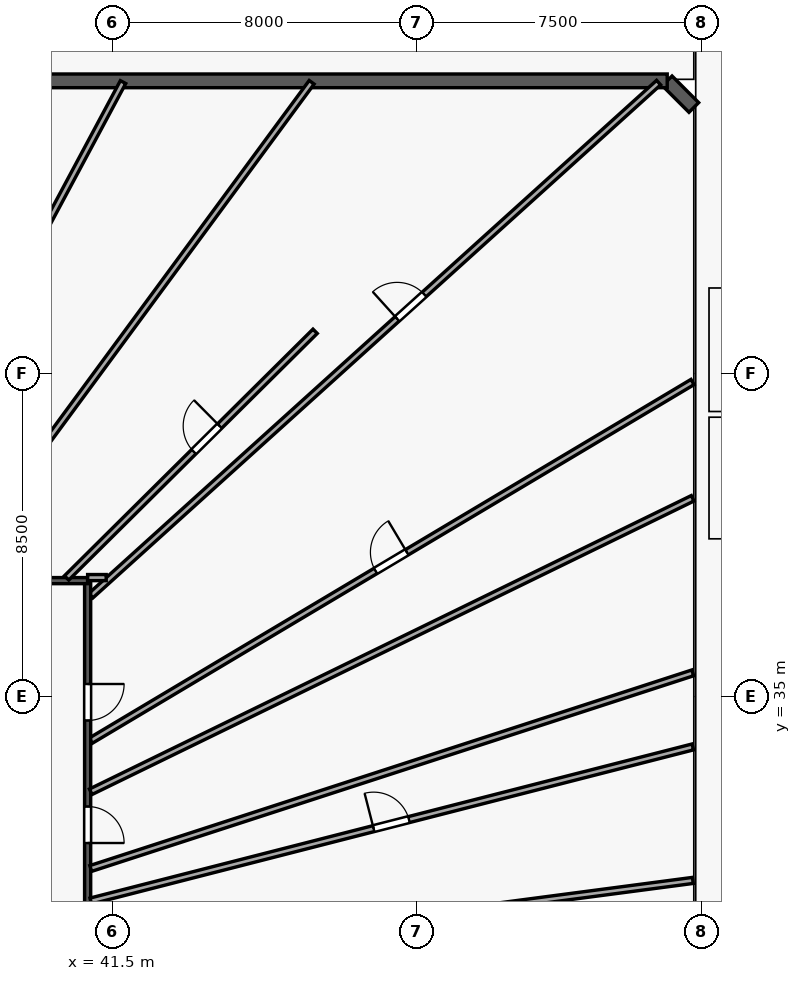
"""IFC4 building model, lengths in metres.
Left out: names, types, materials, properties, quantities, classifications, styles, units other than length and angle.
Written with IfcOpenShell. Run it as: python <this file> out.ifc"""

import sys

from ifc_helpers import new_model, si_unit, direction, frame, frame_2d, origin, origin_with_axes, origin_2d, place, context, subcontext, project, spatial, rectangle, circle, extrude, source, transform, mapped, element, fill, save


model = new_model("IFC4")
c1 = context("Model", 3, precision=1e-05, world=origin(), true_north=direction((0.0, 1.0)))
c2 = subcontext(c1, "Body", "Model", "MODEL_VIEW")
j1 = project(units=[si_unit("LENGTHUNIT", "METRE"), si_unit("PLANEANGLEUNIT", "RADIAN")], contexts=[c1])
p1 = place(None, origin())
s1 = spatial("IfcSite", under=j1, at=p1, CompositionType="ELEMENT")
p2 = place(p1, origin())
s2 = spatial("IfcBuilding", under=s1, at=p2, CompositionType="ELEMENT")
p3 = place(p2, origin())
s3 = spatial("IfcBuildingStorey", under=s2, at=p3, CompositionType="ELEMENT", Elevation=0.0)
m1 = source(origin_with_axes(), c2, "Body", "SweptSolid", [
    extrude(circle(Radius=0.9, at=origin_2d()), origin(), (0.0, 0.0, 1.0), 4.5),
])
p4 = place(p3, frame((46.8, 45.5, 0.0), z_axis=(0.0, 0.0, 1.0), x_axis=(1.0, 0.0, 0.0)))
e1 = element("IfcColumn", 1, at=p4, inside=s3, PredefinedType="COLUMN", context=c2, shape_type="MappedRepresentation", body=[
    mapped(m1, transform((0.0, 0.0, 0.0), scale=1.0)),
])
m2 = source(origin_with_axes(), c2, "Body", "SweptSolid", [
    extrude(rectangle(XDim=0.6, YDim=0.9, at=origin_2d()), origin(), (0.0, 0.0, 1.0), 4.5),
])
for number, where, z_axis, x_axis in (
    (2, (54.8, 34.5, 0.0), (0.0, 0.0, 1.0), (1.0, 0.0, 0.0)),
    (3, (54.8, 42.5, 0.0), (0.0, 0.0, 1.0), (1.0, 0.0, 0.0)),
):
    element("IfcColumn", number, at=place(p3, frame(where, z_axis=z_axis, x_axis=x_axis)), inside=s3, PredefinedType="PILASTER", context=c2, shape_type="MappedRepresentation", body=[
        mapped(m2, transform((0.0, 0.0, 0.0), scale=1.0)),
    ])
p5 = place(p3, frame((56.8, 50.5, 0.0), z_axis=(0.0, 0.0, 1.0), x_axis=(-0.707106781187, 0.707106781187, 0.0)))
e4 = element("IfcWall", 4, at=p5, inside=s3, PredefinedType="SOLIDWALL", context=c2, shape_type="SweptSolid", body=[
    extrude(rectangle(XDim=0.99, YDim=0.36, at=frame_2d((0.495, 0.0))), origin(), (0.0, 0.0, 1.0), 4.2),
])
p6 = place(p3, frame((1.5, 51.2, 0.0), z_axis=(0.0, 0.0, 1.0), x_axis=(1.0, 0.0, 0.0)))
e5 = element("IfcWall", 5, at=p6, inside=s3, PredefinedType="SOLIDWALL", context=c2, shape_type="SweptSolid", body=[
    extrude(rectangle(XDim=54.6, YDim=0.36, at=frame_2d((27.3, 0.0))), origin(), (0.0, 0.0, 1.0), 4.2),
])
p7 = place(p6, frame((51.007, 0.0, 0.85)))
e6 = element("IfcOpeningElement", 6, at=p7, cuts=e5, PredefinedType="OPENING", context=c2, shape_type="SweptSolid", body=[
    extrude(rectangle(XDim=1.8, YDim=2.2, at=frame_2d((0.9, 1.1))), frame((0.0, 0.19, 0.0), z_axis=(0.0, -1.0, 0.0), x_axis=(1.0, 0.0, 0.0)), (0.0, 0.0, 1.0), 0.38),
])
p8 = place(p6, frame((46.765, 0.0, 0.85)))
e7 = element("IfcOpeningElement", 7, at=p8, cuts=e5, PredefinedType="OPENING", context=c2, shape_type="SweptSolid", body=[
    extrude(rectangle(XDim=1.8, YDim=2.2, at=frame_2d((0.9, 1.1))), frame((0.0, 0.19, 0.0), z_axis=(0.0, -1.0, 0.0), x_axis=(1.0, 0.0, 0.0)), (0.0, 0.0, 1.0), 0.38),
])
p9 = place(p6, frame((41.844, 0.0, 0.85)))
e8 = element("IfcOpeningElement", 8, at=p9, cuts=e5, PredefinedType="OPENING", context=c2, shape_type="SweptSolid", body=[
    extrude(rectangle(XDim=1.8, YDim=2.2, at=frame_2d((0.9, 1.1))), frame((0.0, 0.19, 0.0), z_axis=(0.0, -1.0, 0.0), x_axis=(1.0, 0.0, 0.0)), (0.0, 0.0, 1.0), 0.38),
])
p10 = place(p6, frame((36.894, 0.0, 0.85)))
e9 = element("IfcOpeningElement", 9, at=p10, cuts=e5, PredefinedType="OPENING", context=c2, shape_type="SweptSolid", body=[
    extrude(rectangle(XDim=1.8, YDim=2.2, at=frame_2d((0.9, 1.1))), frame((0.0, 0.19, 0.0), z_axis=(0.0, -1.0, 0.0), x_axis=(1.0, 0.0, 0.0)), (0.0, 0.0, 1.0), 0.38),
])
p11 = place(p6, frame((29.542, 0.0, 0.85)))
e10 = element("IfcOpeningElement", 10, at=p11, cuts=e5, PredefinedType="OPENING", context=c2, shape_type="SweptSolid", body=[
    extrude(rectangle(XDim=1.8, YDim=2.2, at=frame_2d((0.9, 1.1))), frame((0.0, 0.19, 0.0), z_axis=(0.0, -1.0, 0.0), x_axis=(1.0, 0.0, 0.0)), (0.0, 0.0, 1.0), 0.38),
])
p12 = place(p6, frame((25.094, 0.0, 0.85)))
e11 = element("IfcOpeningElement", 11, at=p12, cuts=e5, PredefinedType="OPENING", context=c2, shape_type="SweptSolid", body=[
    extrude(rectangle(XDim=1.8, YDim=2.2, at=frame_2d((0.9, 1.1))), frame((0.0, 0.19, 0.0), z_axis=(0.0, -1.0, 0.0), x_axis=(1.0, 0.0, 0.0)), (0.0, 0.0, 1.0), 0.38),
])
p13 = place(p6, frame((11.445, 0.0, 0.85)))
e12 = element("IfcOpeningElement", 12, at=p13, cuts=e5, PredefinedType="OPENING", context=c2, shape_type="SweptSolid", body=[
    extrude(rectangle(XDim=1.8, YDim=2.2, at=frame_2d((0.9, 1.1))), frame((0.0, 0.19, 0.0), z_axis=(0.0, -1.0, 0.0), x_axis=(1.0, 0.0, 0.0)), (0.0, 0.0, 1.0), 0.38),
])
p14 = place(p6, frame((2.908, 0.0, 0.85)))
e13 = element("IfcOpeningElement", 13, at=p14, cuts=e5, PredefinedType="OPENING", context=c2, shape_type="SweptSolid", body=[
    extrude(rectangle(XDim=1.8, YDim=2.2, at=frame_2d((0.9, 1.1))), frame((0.0, 0.19, 0.0), z_axis=(0.0, -1.0, 0.0), x_axis=(1.0, 0.0, 0.0)), (0.0, 0.0, 1.0), 0.38),
])
p15 = place(p6, frame((19.6, 0.0, 0.0)))
e14 = element("IfcOpeningElement", 14, at=p15, cuts=e5, PredefinedType="OPENING", context=c2, shape_type="SweptSolid", body=[
    extrude(rectangle(XDim=1.8, YDim=2.3, at=frame_2d((0.9, 1.15))), frame((0.0, 0.19, 0.0), z_axis=(0.0, -1.0, 0.0), x_axis=(1.0, 0.0, 0.0)), (0.0, 0.0, 1.0), 0.38),
])
p16 = place(p6, frame((22.2, 0.0, 0.0)))
e15 = element("IfcOpeningElement", 15, at=p16, cuts=e5, PredefinedType="OPENING", context=c2, shape_type="SweptSolid", body=[
    extrude(rectangle(XDim=1.8, YDim=2.3, at=frame_2d((0.9, 1.15))), frame((0.0, 0.19, 0.0), z_axis=(0.0, -1.0, 0.0), x_axis=(1.0, 0.0, 0.0)), (0.0, 0.0, 1.0), 0.38),
])
p17 = place(p6, frame((15.5, 0.0, 0.0)))
e16 = element("IfcOpeningElement", 16, at=p17, cuts=e5, PredefinedType="OPENING", context=c2, shape_type="SweptSolid", body=[
    extrude(rectangle(XDim=1.8, YDim=2.3, at=frame_2d((0.9, 1.15))), frame((0.0, 0.19, 0.0), z_axis=(0.0, -1.0, 0.0), x_axis=(1.0, 0.0, 0.0)), (0.0, 0.0, 1.0), 0.38),
])
p18 = place(p3, frame((40.932, 37.652, 0.0), z_axis=(0.0, 0.0, 1.0), x_axis=(0.741982219561, 0.670419559571, 0.0)))
e17 = element("IfcWall", 17, at=p18, inside=s3, PredefinedType="PARTITIONING", context=c2, shape_type="SweptSolid", body=[
    extrude(rectangle(XDim=20.138, YDim=0.16, at=frame_2d((10.069, 0.0))), origin(), (0.0, 0.0, 1.0), 4.2),
])
p19 = place(p18, frame((10.867, 0.0, 0.0)))
e18 = element("IfcOpeningElement", 18, at=p19, cuts=e17, PredefinedType="OPENING", context=c2, shape_type="SweptSolid", body=[
    extrude(rectangle(XDim=0.96, YDim=2.15, at=frame_2d((0.48, 1.075))), frame((0.0, 0.09, 0.0), z_axis=(0.0, -1.0, 0.0), x_axis=(1.0, 0.0, 0.0)), (0.0, 0.0, 1.0), 0.18),
])
p20 = place(p3, frame((40.932, 33.839, 0.0), z_axis=(0.0, 0.0, 1.0), x_axis=(0.859023594577, 0.51193599596, 0.0)))
e19 = element("IfcWall", 19, at=p20, inside=s3, PredefinedType="PARTITIONING", context=c2, shape_type="SweptSolid", body=[
    extrude(rectangle(XDim=18.433, YDim=0.16, at=frame_2d((9.216, 0.0))), origin(), (0.0, 0.0, 1.0), 4.2),
])
p21 = place(p20, frame((8.724, 0.0, 0.0)))
e20 = element("IfcOpeningElement", 20, at=p21, cuts=e19, PredefinedType="OPENING", context=c2, shape_type="SweptSolid", body=[
    extrude(rectangle(XDim=0.96, YDim=2.15, at=frame_2d((0.48, 1.075))), frame((0.0, 0.09, 0.0), z_axis=(0.0, -1.0, 0.0), x_axis=(1.0, 0.0, 0.0)), (0.0, 0.0, 1.0), 0.18),
])
p22 = place(p3, frame((40.85, 38.05, 0.0), z_axis=(0.0, 0.0, 1.0), x_axis=(0.0, -1.0, 0.0)))
e21 = element("IfcWall", 21, at=p22, inside=s3, PredefinedType="PARTITIONING", context=c2, shape_type="SweptSolid", body=[
    extrude(rectangle(XDim=18.508, YDim=0.16, at=frame_2d((9.254, 0.0))), origin(), (0.0, 0.0, 1.0), 3.25),
])
p23 = place(p22, frame((12.99, 0.0, 0.0)))
e22 = element("IfcOpeningElement", 22, at=p23, cuts=e21, PredefinedType="OPENING", context=c2, shape_type="SweptSolid", body=[
    extrude(rectangle(XDim=0.96, YDim=2.15, at=frame_2d((0.48, 1.075))), frame((0.0, 0.09, 0.0), z_axis=(0.0, -1.0, 0.0), x_axis=(1.0, 0.0, 0.0)), (0.0, 0.0, 1.0), 0.18),
])
p24 = place(p22, frame((11.446, 0.0, 0.0)))
e23 = element("IfcOpeningElement", 23, at=p24, cuts=e21, PredefinedType="OPENING", context=c2, shape_type="SweptSolid", body=[
    extrude(rectangle(XDim=0.96, YDim=2.15, at=frame_2d((0.48, 1.075))), frame((0.0, 0.09, 0.0), z_axis=(0.0, -1.0, 0.0), x_axis=(1.0, 0.0, 0.0)), (0.0, 0.0, 1.0), 0.18),
])
p25 = place(p22, frame((8.695, 0.0, 0.0)))
e24 = element("IfcOpeningElement", 24, at=p25, cuts=e21, PredefinedType="OPENING", context=c2, shape_type="SweptSolid", body=[
    extrude(rectangle(XDim=0.96, YDim=2.15, at=frame_2d((0.48, 1.075))), frame((0.0, 0.09, 0.0), z_axis=(0.0, -1.0, 0.0), x_axis=(1.0, 0.0, 0.0)), (0.0, 0.0, 1.0), 0.18),
])
p26 = place(p22, frame((5.944, 0.0, 0.0)))
e25 = element("IfcOpeningElement", 25, at=p26, cuts=e21, PredefinedType="OPENING", context=c2, shape_type="SweptSolid", body=[
    extrude(rectangle(XDim=0.96, YDim=2.15, at=frame_2d((0.48, 1.075))), frame((0.0, 0.09, 0.0), z_axis=(0.0, -1.0, 0.0), x_axis=(1.0, 0.0, 0.0)), (0.0, 0.0, 1.0), 0.18),
])
p27 = place(p22, frame((2.72, 0.0, 0.0)))
e26 = element("IfcOpeningElement", 26, at=p27, cuts=e21, PredefinedType="OPENING", context=c2, shape_type="SweptSolid", body=[
    extrude(rectangle(XDim=0.96, YDim=2.15, at=frame_2d((0.48, 1.075))), frame((0.0, 0.09, 0.0), z_axis=(0.0, -1.0, 0.0), x_axis=(1.0, 0.0, 0.0)), (0.0, 0.0, 1.0), 0.18),
])
p28 = place(p3, frame((40.932, 32.495, 0.0), z_axis=(0.0, 0.0, 1.0), x_axis=(0.898852728793, 0.438250809403, 0.0)))
e27 = element("IfcWall", 27, at=p28, inside=s3, PredefinedType="PARTITIONING", context=c2, shape_type="SweptSolid", body=[
    extrude(rectangle(XDim=17.619, YDim=0.16, at=frame_2d((8.809, 0.0))), origin(), (0.0, 0.0, 1.0), 4.2),
])
p29 = place(p3, frame((40.932, 30.476, 0.0), z_axis=(0.0, 0.0, 1.0), x_axis=(0.951055611127, 0.309019780181, 0.0)))
e28 = element("IfcWall", 28, at=p29, inside=s3, PredefinedType="PARTITIONING", context=c2, shape_type="SweptSolid", body=[
    extrude(rectangle(XDim=16.655, YDim=0.16, at=frame_2d((8.328, 0.0))), origin(), (0.0, 0.0, 1.0), 3.7),
])
p30 = place(p3, frame((40.932, 29.62, 0.0), z_axis=(0.0, 0.0, 1.0), x_axis=(0.968775770521, 0.247938513451, 0.0)))
e29 = element("IfcWall", 29, at=p30, inside=s3, PredefinedType="PARTITIONING", context=c2, shape_type="SweptSolid", body=[
    extrude(rectangle(XDim=16.352, YDim=0.16, at=frame_2d((8.176, 0.0))), origin(), (0.0, 0.0, 1.0), 3.7),
])
p31 = place(p30, frame((7.683, 0.0, 0.0)))
e30 = element("IfcOpeningElement", 30, at=p31, cuts=e29, PredefinedType="OPENING", context=c2, shape_type="SweptSolid", body=[
    extrude(rectangle(XDim=0.96, YDim=2.15, at=frame_2d((0.48, 1.075))), frame((0.0, 0.09, 0.0), z_axis=(0.0, -1.0, 0.0), x_axis=(1.0, 0.0, 0.0)), (0.0, 0.0, 1.0), 0.18),
])
p32 = place(p3, frame((37.144, 38.132, 0.0), z_axis=(0.0, 0.0, 1.0), x_axis=(0.593152727381, 0.805089958949, 0.0)))
e31 = element("IfcWall", 31, at=p32, inside=s3, PredefinedType="PARTITIONING", context=c2, shape_type="SweptSolid", body=[
    extrude(rectangle(XDim=16.185, YDim=0.16, at=frame_2d((8.092, 0.0))), origin(), (0.0, 0.0, 1.0), 4.2),
])
p33 = place(p3, frame((40.917, 28.074, 0.0), z_axis=(0.0, 0.0, 1.0), x_axis=(0.991445045126, 0.130524796478, 0.0)))
e32 = element("IfcWall", 32, at=p33, inside=s3, PredefinedType="PARTITIONING", context=c2, shape_type="SweptSolid", body=[
    extrude(rectangle(XDim=15.994, YDim=0.16, at=frame_2d((7.997, 0.0))), origin(), (0.0, 0.0, 1.0), 3.7),
])
p34 = place(p3, frame((25.6, 38.05, 0.0), z_axis=(0.0, 0.0, 1.0), x_axis=(1.0, 0.0, 0.0)))
e33 = element("IfcWall", 33, at=p34, inside=s3, PredefinedType="PARTITIONING", context=c2, shape_type="SweptSolid", body=[
    extrude(rectangle(XDim=15.25, YDim=0.16, at=frame_2d((7.625, 0.0))), origin(), (0.0, 0.0, 1.0), 4.2),
])
p35 = place(p34, frame((9.677, 0.0, 0.0)))
e34 = element("IfcOpeningElement", 34, at=p35, cuts=e33, PredefinedType="OPENING", context=c2, shape_type="SweptSolid", body=[
    extrude(rectangle(XDim=0.96, YDim=2.15, at=frame_2d((0.48, 1.075))), frame((0.0, 0.09, 0.0), z_axis=(0.0, -1.0, 0.0), x_axis=(1.0, 0.0, 0.0)), (0.0, 0.0, 1.0), 0.18),
])
p36 = place(p34, frame((7.15, 0.0, 0.0)))
e35 = element("IfcOpeningElement", 35, at=p36, cuts=e33, PredefinedType="OPENING", context=c2, shape_type="SweptSolid", body=[
    extrude(rectangle(XDim=0.96, YDim=2.15, at=frame_2d((0.48, 1.075))), frame((0.0, 0.09, 0.0), z_axis=(0.0, -1.0, 0.0), x_axis=(1.0, 0.0, 0.0)), (0.0, 0.0, 1.0), 0.18),
])
p37 = place(p34, frame((4.573, 0.0, 0.0)))
e36 = element("IfcOpeningElement", 36, at=p37, cuts=e33, PredefinedType="OPENING", context=c2, shape_type="SweptSolid", body=[
    extrude(rectangle(XDim=0.96, YDim=2.15, at=frame_2d((0.48, 1.075))), frame((0.0, 0.09, 0.0), z_axis=(0.0, -1.0, 0.0), x_axis=(1.0, 0.0, 0.0)), (0.0, 0.0, 1.0), 0.18),
])
p38 = place(p3, frame((34.792, 38.119, 0.0), z_axis=(0.0, 0.0, 1.0), x_axis=(0.472198527924, 0.881492229249, 0.0)))
e37 = element("IfcWall", 37, at=p38, inside=s3, PredefinedType="PARTITIONING", context=c2, shape_type="SweptSolid", body=[
    extrude(rectangle(XDim=14.802, YDim=0.16, at=frame_2d((7.401, 0.0))), origin(), (0.0, 0.0, 1.0), 4.2),
])
p39 = place(p3, frame((40.297, 38.121, 0.0), z_axis=(0.0, 0.0, 1.0), x_axis=(0.709818075558, 0.704385050673, 0.0)))
e38 = element("IfcWall", 38, at=p39, inside=s3, PredefinedType="PARTITIONING", context=c2, shape_type="SweptSolid", body=[
    extrude(rectangle(XDim=9.212, YDim=0.16, at=frame_2d((4.606, 0.0))), origin(), (0.0, 0.0, 1.0), 3.25),
])
p40 = place(p39, frame((4.713, 0.0, 0.0)))
e39 = element("IfcOpeningElement", 39, at=p40, cuts=e38, PredefinedType="OPENING", context=c2, shape_type="SweptSolid", body=[
    extrude(rectangle(XDim=0.96, YDim=2.15, at=frame_2d((0.48, 1.075))), frame((0.0, 0.09, 0.0), z_axis=(0.0, -1.0, 0.0), x_axis=(1.0, 0.0, 0.0)), (0.0, 0.0, 1.0), 0.18),
])
p41 = place(p3, frame((41.338, 38.13, 0.0), z_axis=(0.0, 0.0, 1.0), x_axis=(-1.0, 0.0, 0.0)))
e40 = element("IfcWall", 40, at=p41, inside=s3, PredefinedType="PARTITIONING", context=c2, shape_type="SweptSolid", body=[
    extrude(rectangle(XDim=0.488, YDim=0.16, at=frame_2d((0.244, 0.0))), origin(), (0.0, 0.0, 1.0), 4.2),
])
m3 = source(origin_with_axes(), c2, "Body", "SweptSolid", [
    extrude(rectangle(XDim=1.8, YDim=2.2, at=frame_2d((0.9, 1.1))), frame((0.0, 0.03, 0.0), z_axis=(0.0, -1.0, 0.0), x_axis=(1.0, 0.0, 0.0)), (0.0, 0.0, 1.0), 0.06),
])
p42 = place(p7, origin())
e41 = element("IfcWindow", 41, at=p42, inside=s3, PartitioningType="SINGLE_PANEL", PredefinedType="WINDOW", context=c2, shape_type="MappedRepresentation", body=[
    mapped(m3, transform((0.0, 0.0, 0.0), scale=1.0)),
])
fill(e6, e41)
p43 = place(p8, origin())
e42 = element("IfcWindow", 42, at=p43, inside=s3, PartitioningType="SINGLE_PANEL", PredefinedType="WINDOW", context=c2, shape_type="MappedRepresentation", body=[
    mapped(m3, transform((0.0, 0.0, 0.0), scale=1.0)),
])
fill(e7, e42)
p44 = place(p9, origin())
e43 = element("IfcWindow", 43, at=p44, inside=s3, PartitioningType="SINGLE_PANEL", PredefinedType="WINDOW", context=c2, shape_type="MappedRepresentation", body=[
    mapped(m3, transform((0.0, 0.0, 0.0), scale=1.0)),
])
fill(e8, e43)
p45 = place(p10, origin())
e44 = element("IfcWindow", 44, at=p45, inside=s3, PartitioningType="SINGLE_PANEL", PredefinedType="WINDOW", context=c2, shape_type="MappedRepresentation", body=[
    mapped(m3, transform((0.0, 0.0, 0.0), scale=1.0)),
])
fill(e9, e44)
m4 = source(origin_with_axes(), c2, "Body", "SweptSolid", [
    extrude(rectangle(XDim=0.96, YDim=2.15, at=frame_2d((0.48, 1.075))), frame((0.0, 0.025, 0.0), z_axis=(0.0, -1.0, 0.0), x_axis=(1.0, 0.0, 0.0)), (0.0, 0.0, 1.0), 0.05),
])
p46 = place(p31, origin())
e45 = element("IfcDoor", 45, at=p46, inside=s3, OperationType="SINGLE_SWING_LEFT", PredefinedType="DOOR", context=c2, shape_type="MappedRepresentation", body=[
    mapped(m4, transform((0.0, 0.0, 0.0), scale=1.0)),
])
fill(e30, e45)
p47 = place(p26, origin())
e46 = element("IfcDoor", 46, at=p47, inside=s3, OperationType="SINGLE_SWING_RIGHT", PredefinedType="DOOR", context=c2, shape_type="MappedRepresentation", body=[
    mapped(m4, transform((0.0, 0.0, 0.0), scale=1.0)),
])
fill(e25, e46)
p48 = place(p27, origin())
e47 = element("IfcDoor", 47, at=p48, inside=s3, OperationType="SINGLE_SWING_LEFT", PredefinedType="DOOR", context=c2, shape_type="MappedRepresentation", body=[
    mapped(m4, transform((0.0, 0.0, 0.0), scale=1.0)),
])
fill(e26, e47)
p49 = place(p21, origin())
e48 = element("IfcDoor", 48, at=p49, inside=s3, OperationType="SINGLE_SWING_RIGHT", PredefinedType="DOOR", context=c2, shape_type="MappedRepresentation", body=[
    mapped(m4, transform((0.0, 0.0, 0.0), scale=1.0)),
])
fill(e20, e48)
p50 = place(p19, origin())
e49 = element("IfcDoor", 49, at=p50, inside=s3, OperationType="SINGLE_SWING_LEFT", PredefinedType="DOOR", context=c2, shape_type="MappedRepresentation", body=[
    mapped(m4, transform((0.0, 0.0, 0.0), scale=1.0)),
])
fill(e18, e49)
p51 = place(p40, origin())
e50 = element("IfcDoor", 50, at=p51, inside=s3, OperationType="SINGLE_SWING_RIGHT", PredefinedType="DOOR", context=c2, shape_type="MappedRepresentation", body=[
    mapped(m4, transform((0.0, 0.0, 0.0), scale=1.0)),
])
fill(e39, e50)
save(model, sys.argv[1])
